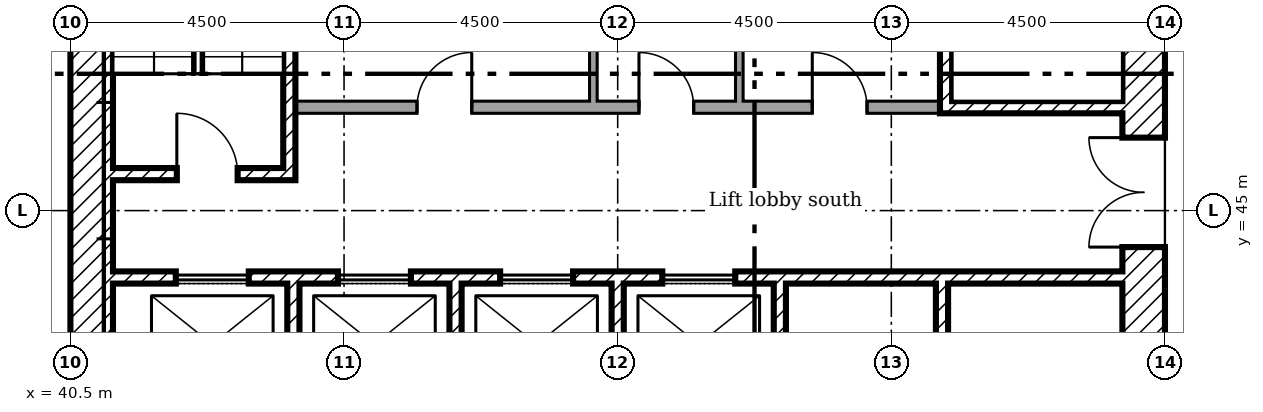
"""IFC4 building model, lengths in metres.
Left out: names, types, materials, properties, quantities, classifications, styles, units other than length and angle.
Written with IfcOpenShell. Run it as: python <this file> out.ifc"""

import sys

from ifc_helpers import new_model, si_unit, direction, frame, frame_2d, origin, place, context, subcontext, project, spatial, rectangle, extrude, element, fill, save


model = new_model("IFC4")
c1 = context("Model", 3, precision=1e-05, world=origin(), true_north=direction((0.0, 1.0)))
c2 = subcontext(c1, "Body", "Model", "MODEL_VIEW")
j1 = project(units=[si_unit("LENGTHUNIT", "METRE"), si_unit("PLANEANGLEUNIT", "RADIAN")], contexts=[c1])
p1 = place(None, origin())
s1 = spatial("IfcSite", under=j1, at=p1, CompositionType="ELEMENT")
p2 = place(p1, origin())
s2 = spatial("IfcBuilding", under=s1, at=p2, CompositionType="ELEMENT")
p3 = place(p2, frame((0.0, 0.0, 131.6)))
s3 = spatial("IfcBuildingStorey", under=s2, at=p3, CompositionType="ELEMENT", Elevation=131.6)
p4 = place(p3, frame((58.15, 40.5, 0.0), z_axis=(0.0, 0.0, 1.0), x_axis=(0.0, 1.0, 0.0)))
e1 = element("IfcWall", 1, at=p4, inside=s3, PredefinedType="SHEAR", context=c2, shape_type="SweptSolid", body=[
    extrude(rectangle(XDim=18.0, YDim=0.7, at=frame_2d((9.0, 0.0))), origin(), (0.0, 0.0, 1.0), 3.35),
])
p5 = place(p4, frame((13.15, 0.0, 0.0)))
e2 = element("IfcOpeningElement", 2, at=p5, cuts=e1, PredefinedType="OPENING", context=c2, shape_type="SweptSolid", body=[
    extrude(rectangle(XDim=1.2, YDim=2.1, at=frame_2d((0.6, 1.05))), frame((0.0, 0.36, 0.0), z_axis=(0.0, -1.0, 0.0), x_axis=(1.0, 0.0, 0.0)), (0.0, 0.0, 1.0), 0.72),
])
p6 = place(p4, frame((3.9, 0.0, 0.0)))
e3 = element("IfcOpeningElement", 3, at=p6, cuts=e1, PredefinedType="OPENING", context=c2, shape_type="SweptSolid", body=[
    extrude(rectangle(XDim=1.8, YDim=2.1, at=frame_2d((0.9, 1.05))), frame((0.0, 0.36, 0.0), z_axis=(0.0, -1.0, 0.0), x_axis=(1.0, 0.0, 0.0)), (0.0, 0.0, 1.0), 0.72),
])
p7 = place(p4, frame((11.525, 0.0, 0.0)))
e4 = element("IfcOpeningElement", 4, at=p7, cuts=e1, PredefinedType="OPENING", context=c2, shape_type="SweptSolid", body=[
    extrude(rectangle(XDim=1.0, YDim=2.1, at=frame_2d((0.5, 1.05))), frame((0.0, 0.36, 0.0), z_axis=(0.0, -1.0, 0.0), x_axis=(1.0, 0.0, 0.0)), (0.0, 0.0, 1.0), 0.72),
])
p8 = place(p3, frame((40.85, 40.5, 0.0), z_axis=(0.0, 0.0, 1.0), x_axis=(0.0, 1.0, 0.0)))
e5 = element("IfcWall", 5, at=p8, inside=s3, PredefinedType="SHEAR", context=c2, shape_type="SweptSolid", body=[
    extrude(rectangle(XDim=18.0, YDim=0.7, at=frame_2d((9.0, 0.0))), origin(), (0.0, 0.0, 1.0), 3.35),
])
for number, where, z_axis, x_axis in (
    (6, (44.167, 41.2, 0.0), (0.0, 0.0, 1.0), (0.0, 1.0, 0.0)),
    (7, (46.833, 41.2, 0.0), (0.0, 0.0, 1.0), (0.0, 1.0, 0.0)),
    (8, (49.5, 41.2, 0.0), (0.0, 0.0, 1.0), (0.0, 1.0, 0.0)),
    (9, (52.167, 41.2, 0.0), (0.0, 0.0, 1.0), (0.0, 1.0, 0.0)),
    (10, (54.833, 41.2, 0.0), (0.0, 0.0, 1.0), (0.0, 1.0, 0.0)),
):
    element("IfcWall", number, at=place(p3, frame(where, z_axis=z_axis, x_axis=x_axis)), inside=s3, PredefinedType="SHEAR", context=c2, shape_type="SweptSolid", body=[
        extrude(rectangle(XDim=2.6, YDim=0.2, at=frame_2d((1.3, 0.0))), origin(), (0.0, 0.0, 1.0), 3.35),
    ])
p9 = place(p3, frame((41.2, 43.9, 0.0)))
e11 = element("IfcWall", 11, at=p9, inside=s3, PredefinedType="SHEAR", context=c2, shape_type="SweptSolid", body=[
    extrude(rectangle(XDim=16.6, YDim=0.2, at=frame_2d((8.3, 0.0))), origin(), (0.0, 0.0, 1.0), 3.35),
])
p10 = place(p9, frame((1.033, 0.0, 0.0)))
e12 = element("IfcOpeningElement", 12, at=p10, cuts=e11, PredefinedType="OPENING", context=c2, shape_type="SweptSolid", body=[
    extrude(rectangle(XDim=1.2, YDim=2.1, at=frame_2d((0.6, 1.05))), frame((0.0, 0.11, 0.0), z_axis=(0.0, -1.0, 0.0), x_axis=(1.0, 0.0, 0.0)), (0.0, 0.0, 1.0), 0.22),
])
p11 = place(p9, frame((3.7, 0.0, 0.0)))
e13 = element("IfcOpeningElement", 13, at=p11, cuts=e11, PredefinedType="OPENING", context=c2, shape_type="SweptSolid", body=[
    extrude(rectangle(XDim=1.2, YDim=2.1, at=frame_2d((0.6, 1.05))), frame((0.0, 0.11, 0.0), z_axis=(0.0, -1.0, 0.0), x_axis=(1.0, 0.0, 0.0)), (0.0, 0.0, 1.0), 0.22),
])
p12 = place(p9, frame((6.367, 0.0, 0.0)))
e14 = element("IfcOpeningElement", 14, at=p12, cuts=e11, PredefinedType="OPENING", context=c2, shape_type="SweptSolid", body=[
    extrude(rectangle(XDim=1.2, YDim=2.1, at=frame_2d((0.6, 1.05))), frame((0.0, 0.11, 0.0), z_axis=(0.0, -1.0, 0.0), x_axis=(1.0, 0.0, 0.0)), (0.0, 0.0, 1.0), 0.22),
])
p13 = place(p9, frame((9.033, 0.0, 0.0)))
e15 = element("IfcOpeningElement", 15, at=p13, cuts=e11, PredefinedType="OPENING", context=c2, shape_type="SweptSolid", body=[
    extrude(rectangle(XDim=1.2, YDim=2.1, at=frame_2d((0.6, 1.05))), frame((0.0, 0.11, 0.0), z_axis=(0.0, -1.0, 0.0), x_axis=(1.0, 0.0, 0.0)), (0.0, 0.0, 1.0), 0.22),
])
p14 = place(p3, frame((44.1, 45.5, 0.0), z_axis=(0.0, 0.0, 1.0), x_axis=(0.0, 1.0, 0.0)))
e16 = element("IfcWall", 16, at=p14, inside=s3, PredefinedType="SHEAR", context=c2, shape_type="SweptSolid", body=[
    extrude(rectangle(XDim=6.9, YDim=0.2, at=frame_2d((3.45, 0.0))), origin(), (0.0, 0.0, 1.0), 3.35),
])
p15 = place(p3, frame((41.2, 45.6, 0.0)))
e17 = element("IfcWall", 17, at=p15, inside=s3, PredefinedType="SHEAR", context=c2, shape_type="SweptSolid", body=[
    extrude(rectangle(XDim=2.8, YDim=0.2, at=frame_2d((1.4, 0.0))), origin(), (0.0, 0.0, 1.0), 3.35),
])
p16 = place(p15, frame((1.05, 0.0, 0.0)))
e18 = element("IfcOpeningElement", 18, at=p16, cuts=e17, PredefinedType="OPENING", context=c2, shape_type="SweptSolid", body=[
    extrude(rectangle(XDim=1.0, YDim=2.1, at=frame_2d((0.5, 1.05))), frame((0.0, 0.11, 0.0), z_axis=(0.0, -1.0, 0.0), x_axis=(1.0, 0.0, 0.0)), (0.0, 0.0, 1.0), 0.22),
])
p17 = place(p3, frame((54.8, 46.7, 0.0)))
e19 = element("IfcWall", 19, at=p17, inside=s3, PredefinedType="SHEAR", context=c2, shape_type="SweptSolid", body=[
    extrude(rectangle(XDim=3.0, YDim=0.2, at=frame_2d((1.5, 0.0))), origin(), (0.0, 0.0, 1.0), 3.35),
])
p18 = place(p3, frame((54.9, 46.8, 0.0), z_axis=(0.0, 0.0, 1.0), x_axis=(0.0, 1.0, 0.0)))
e20 = element("IfcWall", 20, at=p18, inside=s3, PredefinedType="SHEAR", context=c2, shape_type="SweptSolid", body=[
    extrude(rectangle(XDim=6.5, YDim=0.2, at=frame_2d((3.25, 0.0))), origin(), (0.0, 0.0, 1.0), 3.35),
])
p19 = place(p3, frame((44.2, 46.7, 0.0)))
e21 = element("IfcWall", 21, at=p19, inside=s3, PredefinedType="PARTITIONING", context=c2, shape_type="SweptSolid", body=[
    extrude(rectangle(XDim=10.6, YDim=0.2, at=frame_2d((5.3, 0.0))), origin(), (0.0, 0.0, 1.0), 3.35),
])
p20 = place(p19, frame((2.0, 0.0, 0.0)))
e22 = element("IfcOpeningElement", 22, at=p20, cuts=e21, PredefinedType="OPENING", context=c2, shape_type="SweptSolid", body=[
    extrude(rectangle(XDim=0.9, YDim=2.1, at=frame_2d((0.45, 1.05))), frame((0.0, 0.11, 0.0), z_axis=(0.0, -1.0, 0.0), x_axis=(1.0, 0.0, 0.0)), (0.0, 0.0, 1.0), 0.22),
])
p21 = place(p19, frame((5.65, 0.0, 0.0)))
e23 = element("IfcOpeningElement", 23, at=p21, cuts=e21, PredefinedType="OPENING", context=c2, shape_type="SweptSolid", body=[
    extrude(rectangle(XDim=0.9, YDim=2.1, at=frame_2d((0.45, 1.05))), frame((0.0, 0.11, 0.0), z_axis=(0.0, -1.0, 0.0), x_axis=(1.0, 0.0, 0.0)), (0.0, 0.0, 1.0), 0.22),
])
p22 = place(p19, frame((8.5, 0.0, 0.0)))
e24 = element("IfcOpeningElement", 24, at=p22, cuts=e21, PredefinedType="OPENING", context=c2, shape_type="SweptSolid", body=[
    extrude(rectangle(XDim=0.9, YDim=2.1, at=frame_2d((0.45, 1.05))), frame((0.0, 0.11, 0.0), z_axis=(0.0, -1.0, 0.0), x_axis=(1.0, 0.0, 0.0)), (0.0, 0.0, 1.0), 0.22),
])
p23 = place(p3, frame((49.1, 46.8, 0.0), z_axis=(0.0, 0.0, 1.0), x_axis=(0.0, 1.0, 0.0)))
e25 = element("IfcWall", 25, at=p23, inside=s3, PredefinedType="PARTITIONING", context=c2, shape_type="SweptSolid", body=[
    extrude(rectangle(XDim=5.0, YDim=0.125, at=frame_2d((2.5, 0.0))), origin(), (0.0, 0.0, 1.0), 3.35),
])
p24 = place(p3, frame((51.5, 46.8, 0.0), z_axis=(0.0, 0.0, 1.0), x_axis=(0.0, 1.0, 0.0)))
e26 = element("IfcWall", 26, at=p24, inside=s3, PredefinedType="PARTITIONING", context=c2, shape_type="SweptSolid", body=[
    extrude(rectangle(XDim=2.762, YDim=0.125, at=frame_2d((1.381, 0.0))), origin(), (0.0, 0.0, 1.0), 3.35),
])
p25 = place(p6, origin())
e27 = element("IfcDoor", 27, at=p25, inside=s3, OperationType="DOUBLE_DOOR_SINGLE_SWING", PredefinedType="DOOR", context=c2, shape_type="SweptSolid", body=[
    extrude(rectangle(XDim=1.8, YDim=2.1, at=frame_2d((0.9, 1.05))), frame((0.0, 0.025, 0.0), z_axis=(0.0, -1.0, 0.0), x_axis=(1.0, 0.0, 0.0)), (0.0, 0.0, 1.0), 0.05),
])
fill(e3, e27)
p26 = place(p16, origin())
e28 = element("IfcDoor", 28, at=p26, inside=s3, OperationType="SINGLE_SWING_RIGHT", PredefinedType="DOOR", context=c2, shape_type="SweptSolid", body=[
    extrude(rectangle(XDim=1.0, YDim=2.1, at=frame_2d((0.5, 1.05))), frame((0.0, 0.025, 0.0), z_axis=(0.0, -1.0, 0.0), x_axis=(1.0, 0.0, 0.0)), (0.0, 0.0, 1.0), 0.05),
])
fill(e18, e28)
p27 = place(p20, origin())
e29 = element("IfcDoor", 29, at=p27, inside=s3, OperationType="SINGLE_SWING_LEFT", PredefinedType="DOOR", context=c2, shape_type="SweptSolid", body=[
    extrude(rectangle(XDim=0.9, YDim=2.1, at=frame_2d((0.45, 1.05))), frame((0.0, 0.025, 0.0), z_axis=(0.0, -1.0, 0.0), x_axis=(1.0, 0.0, 0.0)), (0.0, 0.0, 1.0), 0.05),
])
fill(e22, e29)
p28 = place(p21, origin())
e30 = element("IfcDoor", 30, at=p28, inside=s3, OperationType="SINGLE_SWING_RIGHT", PredefinedType="DOOR", context=c2, shape_type="SweptSolid", body=[
    extrude(rectangle(XDim=0.9, YDim=2.1, at=frame_2d((0.45, 1.05))), frame((0.0, 0.025, 0.0), z_axis=(0.0, -1.0, 0.0), x_axis=(1.0, 0.0, 0.0)), (0.0, 0.0, 1.0), 0.05),
])
fill(e23, e30)
p29 = place(p22, origin())
e31 = element("IfcDoor", 31, at=p29, inside=s3, OperationType="SINGLE_SWING_RIGHT", PredefinedType="DOOR", context=c2, shape_type="SweptSolid", body=[
    extrude(rectangle(XDim=0.9, YDim=2.1, at=frame_2d((0.45, 1.05))), frame((0.0, 0.025, 0.0), z_axis=(0.0, -1.0, 0.0), x_axis=(1.0, 0.0, 0.0)), (0.0, 0.0, 1.0), 0.05),
])
fill(e24, e31)
p30 = place(p10, origin())
e32 = element("IfcDoor", 32, at=p30, inside=s3, OperationType="SLIDING_TO_LEFT", PredefinedType="DOOR", context=c2, shape_type="SweptSolid", body=[
    extrude(rectangle(XDim=1.2, YDim=2.1, at=frame_2d((0.6, 1.05))), frame((0.0, 0.025, 0.0), z_axis=(0.0, -1.0, 0.0), x_axis=(1.0, 0.0, 0.0)), (0.0, 0.0, 1.0), 0.05),
])
fill(e12, e32)
p31 = place(p11, origin())
e33 = element("IfcDoor", 33, at=p31, inside=s3, OperationType="SLIDING_TO_LEFT", PredefinedType="DOOR", context=c2, shape_type="SweptSolid", body=[
    extrude(rectangle(XDim=1.2, YDim=2.1, at=frame_2d((0.6, 1.05))), frame((0.0, 0.025, 0.0), z_axis=(0.0, -1.0, 0.0), x_axis=(1.0, 0.0, 0.0)), (0.0, 0.0, 1.0), 0.05),
])
fill(e13, e33)
p32 = place(p12, origin())
e34 = element("IfcDoor", 34, at=p32, inside=s3, OperationType="SLIDING_TO_LEFT", PredefinedType="DOOR", context=c2, shape_type="SweptSolid", body=[
    extrude(rectangle(XDim=1.2, YDim=2.1, at=frame_2d((0.6, 1.05))), frame((0.0, 0.025, 0.0), z_axis=(0.0, -1.0, 0.0), x_axis=(1.0, 0.0, 0.0)), (0.0, 0.0, 1.0), 0.05),
])
fill(e14, e34)
p33 = place(p13, origin())
e35 = element("IfcDoor", 35, at=p33, inside=s3, OperationType="SLIDING_TO_LEFT", PredefinedType="DOOR", context=c2, shape_type="SweptSolid", body=[
    extrude(rectangle(XDim=1.2, YDim=2.1, at=frame_2d((0.6, 1.05))), frame((0.0, 0.025, 0.0), z_axis=(0.0, -1.0, 0.0), x_axis=(1.0, 0.0, 0.0)), (0.0, 0.0, 1.0), 0.05),
])
fill(e15, e35)
save(model, sys.argv[1])
